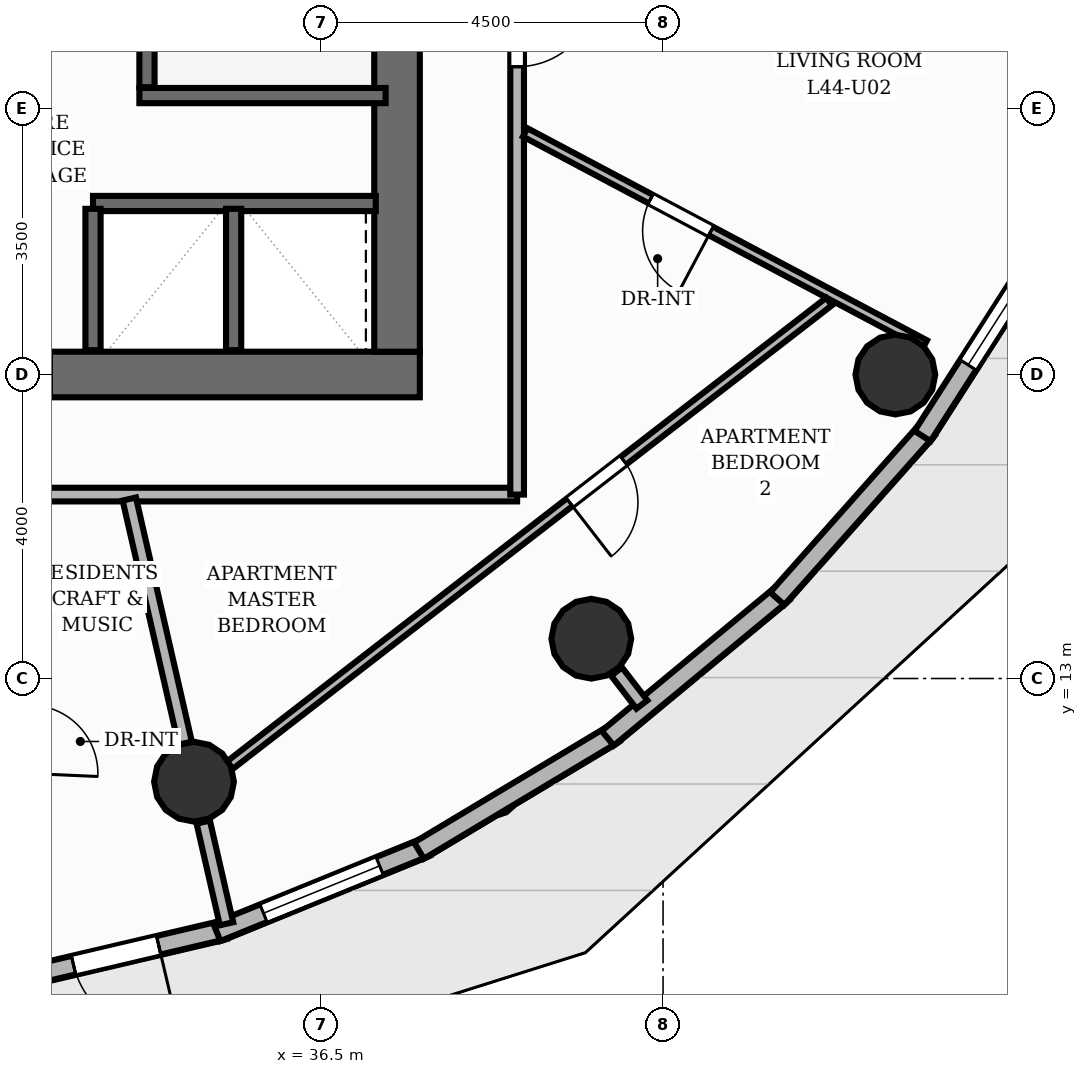
"""IFC4 building model, lengths in metres.
Left out: names, types, materials, properties, quantities, classifications, styles, units other than length and angle.
Written with IfcOpenShell. Run it as: python <this file> out.ifc"""

import sys

from ifc_helpers import new_model, si_unit, direction, frame, frame_2d, origin, origin_2d, place, context, subcontext, project, spatial, rectangle, circle, extrude, element, fill, save


model = new_model("IFC4")
c1 = context("Model", 3, precision=1e-05, world=origin(), true_north=direction((0.0, 1.0)))
c2 = subcontext(c1, "Body", "Model", "MODEL_VIEW")
j1 = project(units=[si_unit("LENGTHUNIT", "METRE"), si_unit("PLANEANGLEUNIT", "RADIAN")], contexts=[c1])
p1 = place(None, origin())
s1 = spatial("IfcSite", under=j1, at=p1, CompositionType="ELEMENT")
p2 = place(p1, origin())
s2 = spatial("IfcBuilding", under=s1, at=p2, CompositionType="ELEMENT")
p3 = place(p2, frame((0.0, 0.0, 148.96)))
s3 = spatial("IfcBuildingStorey", under=s2, at=p3, CompositionType="ELEMENT", Elevation=148.96)
p4 = place(p3, frame((22.7, 17.0, 0.0), z_axis=(0.0, 0.0, 1.0), x_axis=(1.0, 0.0, 0.0)))
e1 = element("IfcWall", 1, at=p4, inside=s3, PredefinedType="SHEAR", context=c2, shape_type="SweptSolid", body=[
    extrude(rectangle(XDim=15.1, YDim=0.6, at=frame_2d((7.55, 0.0))), origin(), (0.0, 0.0, 1.0), 3.2),
])
p5 = place(p4, frame((5.8, 0.0, 0.0)))
e2 = element("IfcOpeningElement", 2, at=p5, cuts=e1, PredefinedType="OPENING", context=c2, shape_type="SweptSolid", body=[
    extrude(rectangle(XDim=1.1, YDim=2.15, at=frame_2d((0.55, 1.075))), frame((0.0, 0.31, 0.0), z_axis=(0.0, -1.0, 0.0), x_axis=(1.0, 0.0, 0.0)), (0.0, 0.0, 1.0), 0.62),
])
p6 = place(p4, frame((9.35, 0.0, 0.0)))
e3 = element("IfcOpeningElement", 3, at=p6, cuts=e1, PredefinedType="OPENING", context=c2, shape_type="SweptSolid", body=[
    extrude(rectangle(XDim=0.9, YDim=2.1, at=frame_2d((0.45, 1.05))), frame((0.0, 0.31, 0.0), z_axis=(0.0, -1.0, 0.0), x_axis=(1.0, 0.0, 0.0)), (0.0, 0.0, 1.0), 0.62),
])
p7 = place(p3, frame((37.5, 17.3, 0.0), z_axis=(0.0, 0.0, 1.0), x_axis=(0.0, 1.0, 0.0)))
e4 = element("IfcWall", 4, at=p7, inside=s3, PredefinedType="SHEAR", context=c2, shape_type="SweptSolid", body=[
    extrude(rectangle(XDim=13.4, YDim=0.6, at=frame_2d((6.7, 0.0))), origin(), (0.0, 0.0, 1.0), 3.2),
])
for number, where, z_axis, x_axis in (
    (5, (34.829, 11.642, 0.0), (0.0, 0.0, 1.0), (1.0, 0.0, 0.0)),
    (6, (40.056, 13.523, 0.0), (0.0, 0.0, 1.0), (1.0, 0.0, 0.0)),
    (7, (44.056, 17.0, 0.0), (0.0, 0.0, 1.0), (1.0, 0.0, 0.0)),
):
    element("IfcColumn", number, at=place(p3, frame(where, z_axis=z_axis, x_axis=x_axis)), inside=s3, PredefinedType="COLUMN", context=c2, shape_type="SweptSolid", body=[
        extrude(circle(Radius=0.525, at=origin_2d()), origin(), (0.0, 0.0, 1.0), 3.2),
    ])
p8 = place(p3, frame((35.233, 9.695, 0.0), z_axis=(0.0, 0.0, 1.0), x_axis=(-0.973538048261, -0.228524984602, 0.0)))
e8 = element("IfcWall", 8, at=p8, inside=s3, PredefinedType="SOLIDWALL", context=c2, shape_type="SweptSolid", body=[
    extrude(rectangle(XDim=2.937, YDim=0.25, at=frame_2d((1.468, 0.0))), origin(), (0.0, 0.0, 1.0), 2.96),
])
p9 = place(p8, frame((0.893, 0.0, 0.0)))
e9 = element("IfcOpeningElement", 9, at=p9, cuts=e8, PredefinedType="OPENING", context=c2, shape_type="SweptSolid", body=[
    extrude(rectangle(XDim=1.15, YDim=2.2, at=frame_2d((0.575, 1.1))), frame((0.0, 0.135, 0.0), z_axis=(0.0, -1.0, 0.0), x_axis=(1.0, 0.0, 0.0)), (0.0, 0.0, 1.0), 0.27),
])
p10 = place(p3, frame((37.886, 10.785, 0.0), z_axis=(0.0, 0.0, 1.0), x_axis=(-0.926076439021, -0.377335963154, 0.0)))
e10 = element("IfcWall", 10, at=p10, inside=s3, PredefinedType="SOLIDWALL", context=c2, shape_type="SweptSolid", body=[
    extrude(rectangle(XDim=2.977, YDim=0.25, at=frame_2d((1.488, 0.0))), origin(), (0.0, 0.0, 1.0), 2.96),
])
p11 = place(p10, frame((0.664, 0.0, 0.85)))
e11 = element("IfcOpeningElement", 11, at=p11, cuts=e10, PredefinedType="OPENING", context=c2, shape_type="SweptSolid", body=[
    extrude(rectangle(XDim=1.65, YDim=1.55, at=frame_2d((0.825, 0.775))), frame((0.0, 0.135, 0.0), z_axis=(0.0, -1.0, 0.0), x_axis=(1.0, 0.0, 0.0)), (0.0, 0.0, 1.0), 0.27),
])
for number, where, z_axis, x_axis in (
    (12, (40.361, 12.277, 0.0), (0.0, 0.0, 1.0), (-0.858, -0.514, 0.0)),
    (13, (42.581, 14.127, 0.0), (0.0, 0.0, 1.0), (-0.77, -0.638, 0.0)),
):
    element("IfcWall", number, at=place(p3, frame(where, z_axis=z_axis, x_axis=x_axis)), inside=s3, PredefinedType="SOLIDWALL", context=c2, shape_type="SweptSolid", body=[
        extrude(rectangle(XDim=2.998, YDim=0.25, at=frame_2d((1.499, 0.0))), origin(), (0.0, 0.0, 1.0), 2.96),
    ])
p12 = place(p3, frame((44.48, 16.277, 0.0), z_axis=(0.0, 0.0, 1.0), x_axis=(-0.664002369324, -0.747730468506, 0.0)))
e14 = element("IfcWall", 14, at=p12, inside=s3, PredefinedType="SOLIDWALL", context=c2, shape_type="SweptSolid", body=[
    extrude(rectangle(XDim=2.977, YDim=0.25, at=frame_2d((1.489, 0.0))), origin(), (0.0, 0.0, 1.0), 2.96),
])
p13 = place(p3, frame((45.998, 18.663, 0.0), z_axis=(0.0, 0.0, 1.0), x_axis=(-0.539492373821, -0.841990486044, 0.0)))
e15 = element("IfcWall", 15, at=p13, inside=s3, PredefinedType="SOLIDWALL", context=c2, shape_type="SweptSolid", body=[
    extrude(rectangle(XDim=2.937, YDim=0.25, at=frame_2d((1.469, 0.0))), origin(), (0.0, 0.0, 1.0), 2.96),
])
p14 = place(p13, frame((0.175, 0.0, 0.85)))
e16 = element("IfcOpeningElement", 16, at=p14, cuts=e15, PredefinedType="OPENING", context=c2, shape_type="SweptSolid", body=[
    extrude(rectangle(XDim=1.65, YDim=1.55, at=frame_2d((0.825, 0.775))), frame((0.0, 0.135, 0.0), z_axis=(0.0, -1.0, 0.0), x_axis=(1.0, 0.0, 0.0)), (0.0, 0.0, 1.0), 0.27),
])
p15 = place(p3, frame((34.21, 20.78, 0.0), z_axis=(0.0, 0.0, 1.0), x_axis=(0.0, 1.0, 0.0)))
e17 = element("IfcWall", 17, at=p15, inside=s3, PredefinedType="SHEAR", context=c2, shape_type="SweptSolid", body=[
    extrude(rectangle(XDim=6.44, YDim=0.2, at=frame_2d((3.22, 0.0))), origin(), (0.0, 0.0, 1.0), 3.2),
])
p16 = place(p3, frame((34.11, 20.67, 0.0), z_axis=(0.0, 0.0, 1.0), x_axis=(1.0, 0.0, 0.0)))
e18 = element("IfcWall", 18, at=p16, inside=s3, PredefinedType="SHEAR", context=c2, shape_type="SweptSolid", body=[
    extrude(rectangle(XDim=3.24, YDim=0.2, at=frame_2d((1.62, 0.0))), origin(), (0.0, 0.0, 1.0), 3.2),
])
p17 = place(p3, frame((33.5, 19.25, 0.0), z_axis=(0.0, 0.0, 1.0), x_axis=(1.0, 0.0, 0.0)))
e19 = element("IfcWall", 19, at=p17, inside=s3, PredefinedType="SHEAR", context=c2, shape_type="SweptSolid", body=[
    extrude(rectangle(XDim=3.72, YDim=0.2, at=frame_2d((1.86, 0.0))), origin(), (0.0, 0.0, 1.0), 3.2),
])
for number, where, z_axis, x_axis in (
    (20, (33.5, 17.32, 0.0), (0.0, 0.0, 1.0), (0.0, 1.0, 0.0)),
    (21, (35.35, 17.32, 0.0), (0.0, 0.0, 1.0), (0.0, 1.0, 0.0)),
):
    element("IfcWall", number, at=place(p3, frame(where, z_axis=z_axis, x_axis=x_axis)), inside=s3, PredefinedType="SHEAR", context=c2, shape_type="SweptSolid", body=[
        extrude(rectangle(XDim=1.86, YDim=0.2, at=frame_2d((0.93, 0.0))), origin(), (0.0, 0.0, 1.0), 3.2),
    ])
p18 = place(p3, frame((34.95, 11.111, 0.0), z_axis=(0.0, 0.0, 1.0), x_axis=(0.223027623572, -0.974812125039, 0.0)))
e22 = element("IfcWall", 22, at=p18, inside=s3, PredefinedType="PARTITIONING", context=c2, shape_type="SweptSolid", body=[
    extrude(rectangle(XDim=1.373, YDim=0.18, at=frame_2d((0.687, 0.0))), origin(), (0.0, 0.0, 1.0), 2.336),
])
p19 = place(p3, frame((40.388, 13.092, 0.0), z_axis=(0.0, 0.0, 1.0), x_axis=(0.6096676216, -0.792657171275, 0.0)))
e23 = element("IfcWall", 23, at=p19, inside=s3, PredefinedType="PARTITIONING", context=c2, shape_type="SweptSolid", body=[
    extrude(rectangle(XDim=0.547, YDim=0.18, at=frame_2d((0.273, 0.0))), origin(), (0.0, 0.0, 1.0), 2.336),
])
p20 = place(p3, frame((39.08, 15.42, 0.0), z_axis=(0.0, 0.0, 1.0), x_axis=(-1.0, 0.0, 0.0)))
e24 = element("IfcWall", 24, at=p20, inside=s3, PredefinedType="PARTITIONING", context=c2, shape_type="SweptSolid", body=[
    extrude(rectangle(XDim=17.66, YDim=0.18, at=frame_2d((8.83, 0.0))), origin(), (0.0, 0.0, 1.0), 2.955),
])
p21 = place(p20, frame((7.368, 0.0, 0.0)))
e25 = element("IfcOpeningElement", 25, at=p21, cuts=e24, PredefinedType="OPENING", context=c2, shape_type="SweptSolid", body=[
    extrude(rectangle(XDim=0.9, YDim=2.1, at=frame_2d((0.45, 1.05))), frame((0.0, 0.1, 0.0), z_axis=(0.0, -1.0, 0.0), x_axis=(1.0, 0.0, 0.0)), (0.0, 0.0, 1.0), 0.2),
])
p22 = place(p20, frame((10.224, 0.0, 0.0)))
e26 = element("IfcOpeningElement", 26, at=p22, cuts=e24, PredefinedType="OPENING", context=c2, shape_type="SweptSolid", body=[
    extrude(rectangle(XDim=0.9, YDim=2.1, at=frame_2d((0.45, 1.05))), frame((0.0, 0.1, 0.0), z_axis=(0.0, -1.0, 0.0), x_axis=(1.0, 0.0, 0.0)), (0.0, 0.0, 1.0), 0.2),
])
p23 = place(p20, frame((14.353, 0.0, 0.0)))
e27 = element("IfcOpeningElement", 27, at=p23, cuts=e24, PredefinedType="OPENING", context=c2, shape_type="SweptSolid", body=[
    extrude(rectangle(XDim=0.9, YDim=2.1, at=frame_2d((0.45, 1.05))), frame((0.0, 0.1, 0.0), z_axis=(0.0, -1.0, 0.0), x_axis=(1.0, 0.0, 0.0)), (0.0, 0.0, 1.0), 0.2),
])
p24 = place(p3, frame((39.08, 28.645, 0.0), z_axis=(0.0, 0.0, 1.0), x_axis=(0.0, -1.0, 0.0)))
e28 = element("IfcWall", 28, at=p24, inside=s3, PredefinedType="PARTITIONING", context=c2, shape_type="SweptSolid", body=[
    extrude(rectangle(XDim=13.225, YDim=0.18, at=frame_2d((6.613, 0.0))), origin(), (0.0, 0.0, 1.0), 2.955),
])
p25 = place(p24, frame((6.545, 0.0, 0.0)))
e29 = element("IfcOpeningElement", 29, at=p25, cuts=e28, PredefinedType="OPENING", context=c2, shape_type="SweptSolid", body=[
    extrude(rectangle(XDim=1.05, YDim=2.15, at=frame_2d((0.525, 1.075))), frame((0.0, 0.1, 0.0), z_axis=(0.0, -1.0, 0.0), x_axis=(1.0, 0.0, 0.0)), (0.0, 0.0, 1.0), 0.2),
])
p26 = place(p24, frame((1.812, 0.0, 0.0)))
e30 = element("IfcOpeningElement", 30, at=p26, cuts=e28, PredefinedType="OPENING", context=c2, shape_type="SweptSolid", body=[
    extrude(rectangle(XDim=0.9, YDim=2.1, at=frame_2d((0.45, 1.05))), frame((0.0, 0.1, 0.0), z_axis=(0.0, -1.0, 0.0), x_axis=(1.0, 0.0, 0.0)), (0.0, 0.0, 1.0), 0.2),
])
p27 = place(p3, frame((33.977, 15.362, 0.0), z_axis=(0.0, 0.0, 1.0), x_axis=(0.22319287001, -0.974774303506, 0.0)))
e31 = element("IfcWall", 31, at=p27, inside=s3, PredefinedType="PARTITIONING", context=c2, shape_type="SweptSolid", body=[
    extrude(rectangle(XDim=3.296, YDim=0.18, at=frame_2d((1.648, 0.0))), origin(), (0.0, 0.0, 1.0), 2.336),
])
p28 = place(p3, frame((44.443, 17.395, 0.0), z_axis=(0.0, 0.0, 1.0), x_axis=(-0.883258541518, 0.468886285612, 0.0)))
e32 = element("IfcWall", 32, at=p28, inside=s3, PredefinedType="PARTITIONING", context=c2, shape_type="SweptSolid", body=[
    extrude(rectangle(XDim=5.952, YDim=0.125, at=frame_2d((2.976, 0.0))), origin(), (0.0, 0.0, 1.0), 2.955),
])
p29 = place(p28, frame((3.184, 0.0, 0.0)))
e33 = element("IfcOpeningElement", 33, at=p29, cuts=e32, PredefinedType="OPENING", context=c2, shape_type="SweptSolid", body=[
    extrude(rectangle(XDim=0.9, YDim=2.1, at=frame_2d((0.45, 1.05))), frame((0.0, 0.073, 0.0), z_axis=(0.0, -1.0, 0.0), x_axis=(1.0, 0.0, 0.0)), (0.0, 0.0, 1.0), 0.145),
])
p30 = place(p3, frame((43.184, 17.96, 0.0), z_axis=(0.0, 0.0, 1.0), x_axis=(-0.790862802872, -0.611993486104, 0.0)))
e34 = element("IfcWall", 34, at=p30, inside=s3, PredefinedType="PARTITIONING", context=c2, shape_type="SweptSolid", body=[
    extrude(rectangle(XDim=9.975, YDim=0.125, at=frame_2d((4.987, 0.0))), origin(), (0.0, 0.0, 1.0), 2.411),
])
p31 = place(p30, frame((3.417, 0.0, 0.0)))
e35 = element("IfcOpeningElement", 35, at=p31, cuts=e34, PredefinedType="OPENING", context=c2, shape_type="SweptSolid", body=[
    extrude(rectangle(XDim=0.9, YDim=2.1, at=frame_2d((0.45, 1.05))), frame((0.0, 0.073, 0.0), z_axis=(0.0, -1.0, 0.0), x_axis=(1.0, 0.0, 0.0)), (0.0, 0.0, 1.0), 0.145),
])
p32 = place(p9, origin())
e36 = element("IfcDoor", 36, at=p32, inside=s3, OperationType="SINGLE_SWING_LEFT", PredefinedType="DOOR", context=c2, shape_type="SweptSolid", body=[
    extrude(rectangle(XDim=1.15, YDim=2.2, at=frame_2d((0.575, 1.1))), frame((0.0, 0.025, 0.0), z_axis=(0.0, -1.0, 0.0), x_axis=(1.0, 0.0, 0.0)), (0.0, 0.0, 1.0), 0.05),
])
fill(e9, e36)
p33 = place(p11, origin())
e37 = element("IfcWindow", 37, at=p33, inside=s3, PartitioningType="SINGLE_PANEL", PredefinedType="WINDOW", context=c2, shape_type="SweptSolid", body=[
    extrude(rectangle(XDim=1.65, YDim=1.55, at=frame_2d((0.825, 0.775))), frame((0.0, 0.03, 0.0), z_axis=(0.0, -1.0, 0.0), x_axis=(1.0, 0.0, 0.0)), (0.0, 0.0, 1.0), 0.06),
])
fill(e11, e37)
p34 = place(p14, origin())
e38 = element("IfcWindow", 38, at=p34, inside=s3, PartitioningType="SINGLE_PANEL", PredefinedType="WINDOW", context=c2, shape_type="SweptSolid", body=[
    extrude(rectangle(XDim=1.65, YDim=1.55, at=frame_2d((0.825, 0.775))), frame((0.0, 0.03, 0.0), z_axis=(0.0, -1.0, 0.0), x_axis=(1.0, 0.0, 0.0)), (0.0, 0.0, 1.0), 0.06),
])
fill(e16, e38)
p35 = place(p25, origin())
e39 = element("IfcDoor", 39, at=p35, inside=s3, OperationType="SINGLE_SWING_LEFT", PredefinedType="DOOR", context=c2, shape_type="SweptSolid", body=[
    extrude(rectangle(XDim=1.05, YDim=2.15, at=frame_2d((0.525, 1.075))), frame((0.0, 0.025, 0.0), z_axis=(0.0, -1.0, 0.0), x_axis=(1.0, 0.0, 0.0)), (0.0, 0.0, 1.0), 0.05),
])
fill(e29, e39)
p36 = place(p29, origin())
e40 = element("IfcDoor", 40, at=p36, inside=s3, OperationType="SINGLE_SWING_LEFT", PredefinedType="DOOR", context=c2, shape_type="SweptSolid", body=[
    extrude(rectangle(XDim=0.9, YDim=2.1, at=frame_2d((0.45, 1.05))), frame((0.0, 0.025, 0.0), z_axis=(0.0, -1.0, 0.0), x_axis=(1.0, 0.0, 0.0)), (0.0, 0.0, 1.0), 0.05),
])
fill(e33, e40)
p37 = place(p31, origin())
e41 = element("IfcDoor", 41, at=p37, inside=s3, OperationType="SINGLE_SWING_RIGHT", PredefinedType="DOOR", context=c2, shape_type="SweptSolid", body=[
    extrude(rectangle(XDim=0.9, YDim=2.1, at=frame_2d((0.45, 1.05))), frame((0.0, 0.025, 0.0), z_axis=(0.0, -1.0, 0.0), x_axis=(1.0, 0.0, 0.0)), (0.0, 0.0, 1.0), 0.05),
])
fill(e35, e41)
save(model, sys.argv[1])
